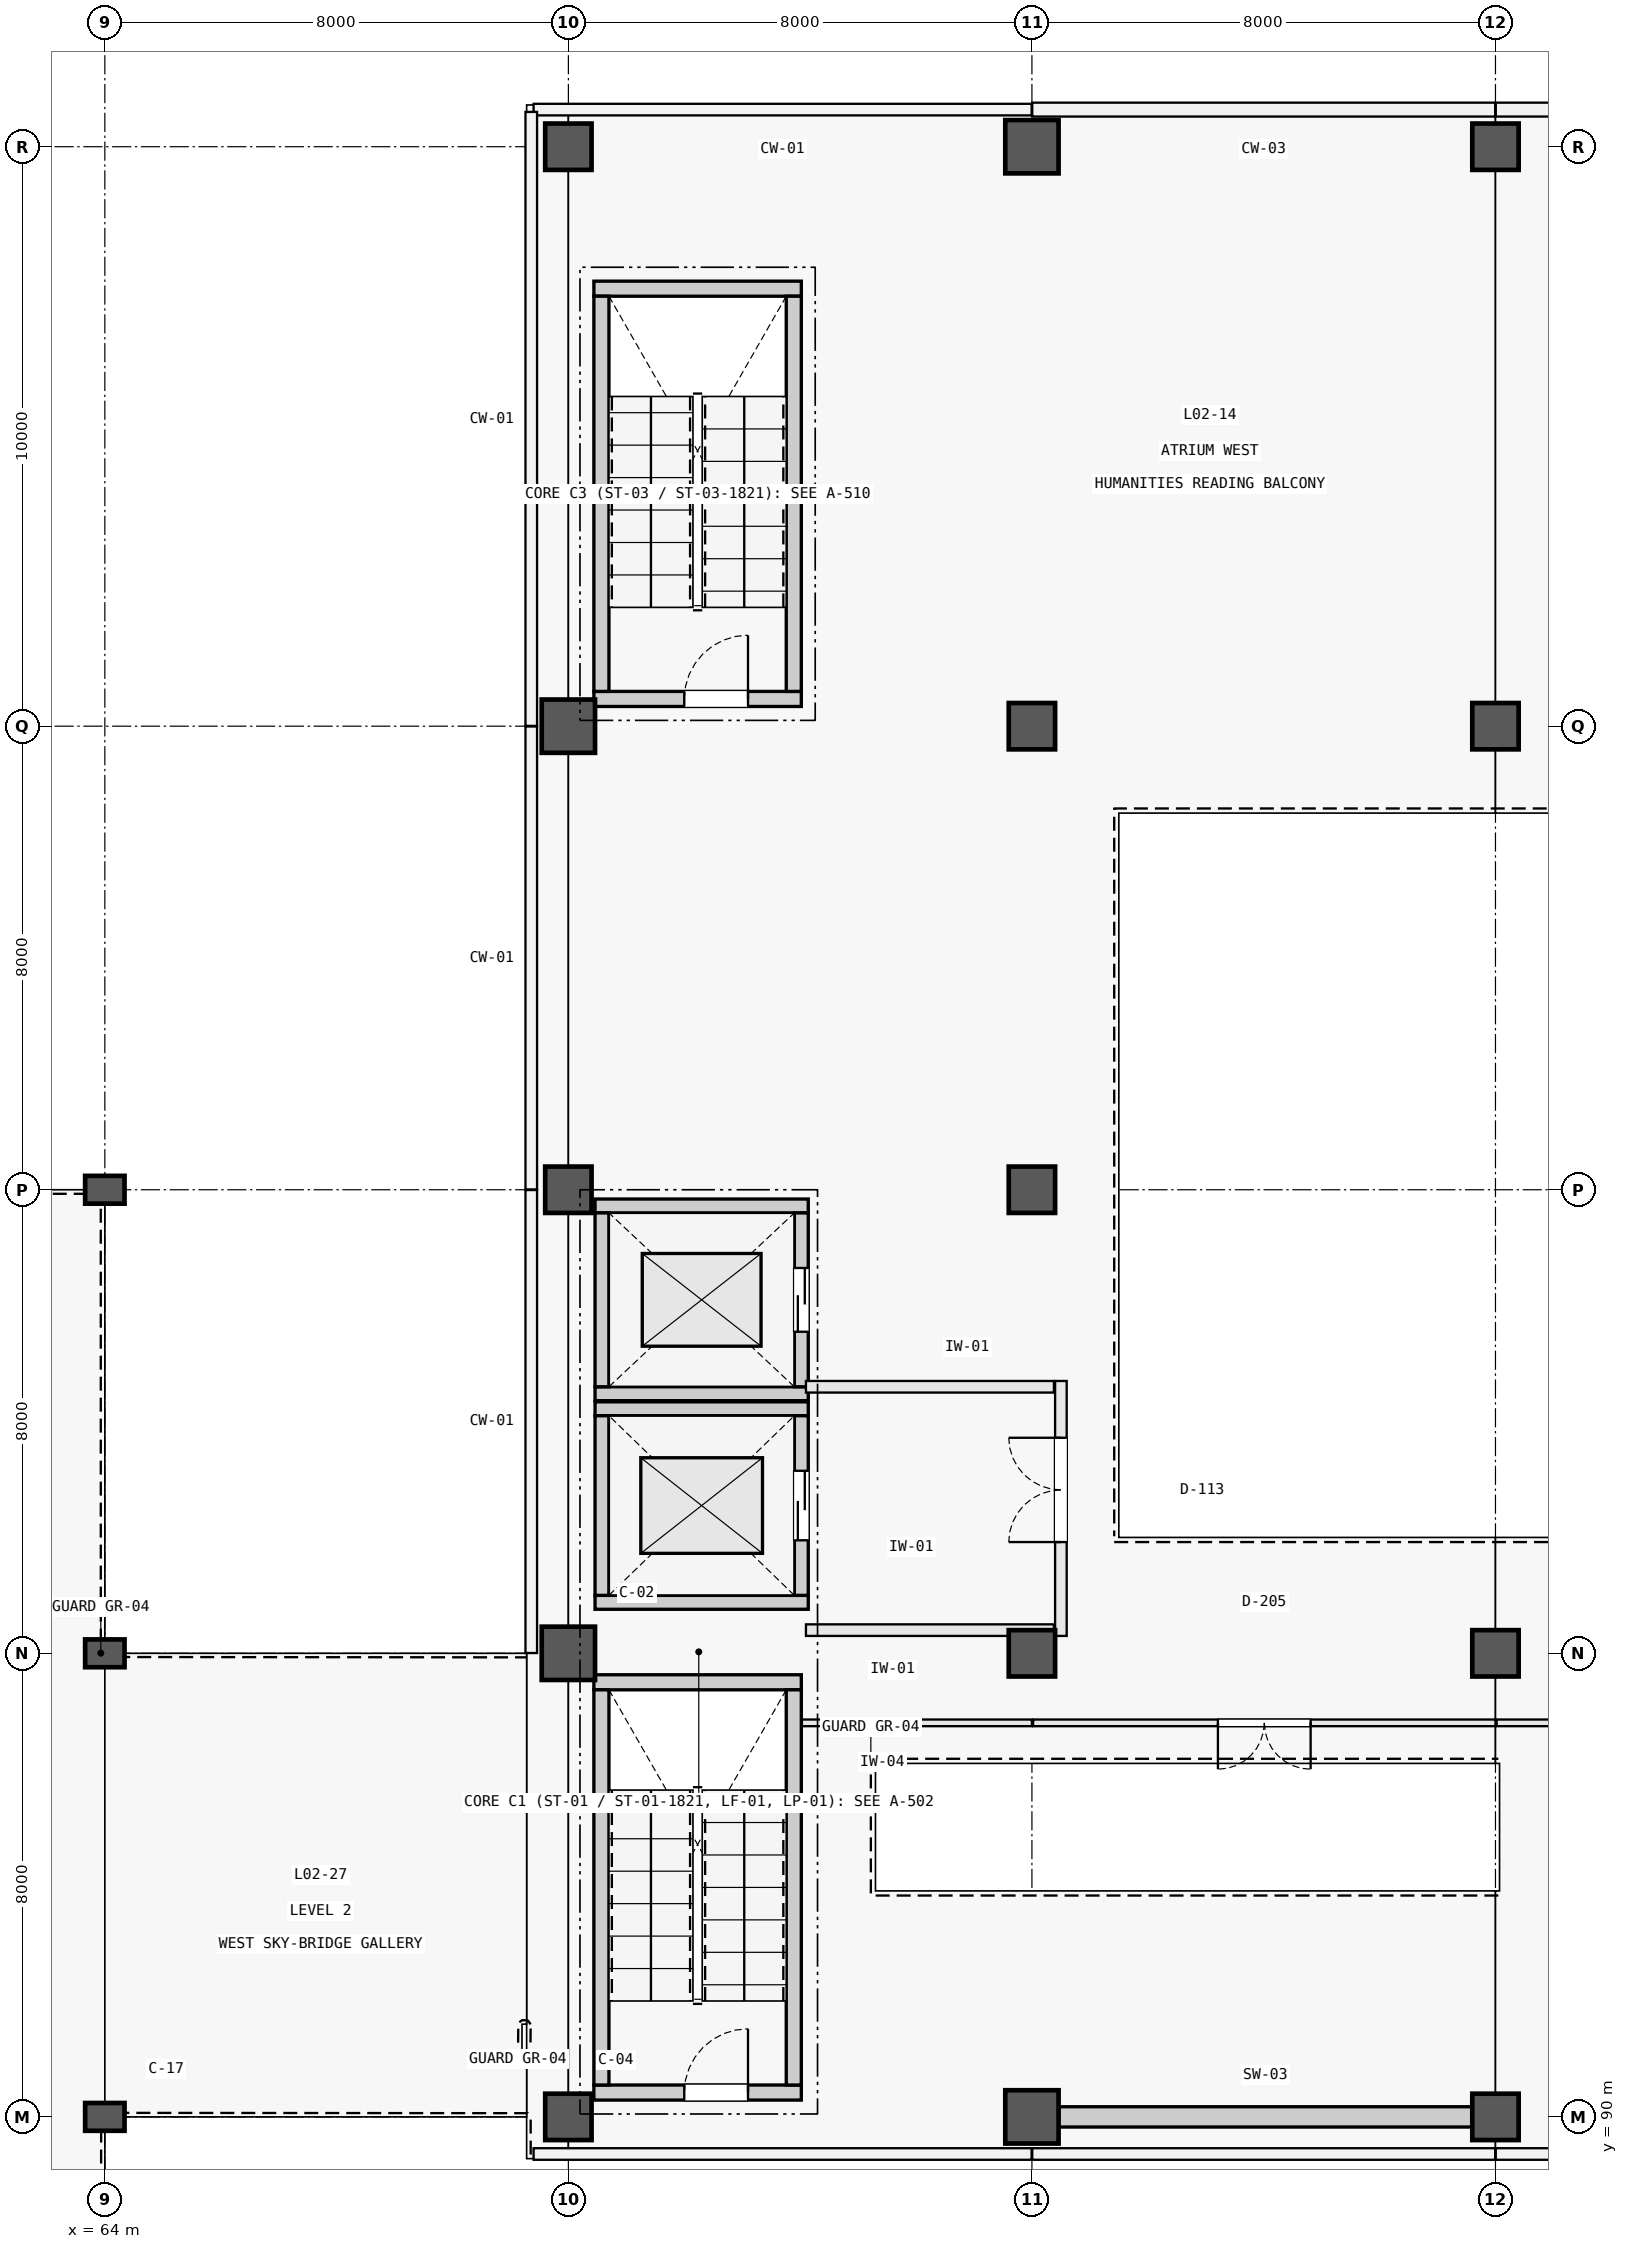
"""IFC4 building model, lengths in metres.
Left out: names, types, materials, properties, quantities, classifications, styles, units other than length and angle.
Written with IfcOpenShell. Run it as: python <this file> out.ifc"""

import sys

from ifc_helpers import new_model, si_unit, direction, frame, frame_2d, origin, origin_2d, place, context, subcontext, project, spatial, rectangle, extrude, element, fill, save


model = new_model("IFC4")
c1 = context("Model", 3, precision=1e-05, world=origin(), true_north=direction((0.0, 1.0)))
c2 = subcontext(c1, "Body", "Model", "MODEL_VIEW")
j1 = project(units=[si_unit("LENGTHUNIT", "METRE"), si_unit("PLANEANGLEUNIT", "RADIAN")], contexts=[c1])
p1 = place(None, origin())
s1 = spatial("IfcSite", under=j1, at=p1, CompositionType="ELEMENT")
p2 = place(p1, origin())
s2 = spatial("IfcBuilding", under=s1, at=p2, CompositionType="ELEMENT")
p3 = place(p2, frame((0.0, 0.0, 5.4)))
s3 = spatial("IfcBuildingStorey", under=s2, at=p3, CompositionType="ELEMENT", Elevation=5.4)
for number, where, z_axis, x_axis in (
    (1, (64.0, 90.0, 0.0), (0.0, 0.0, 1.0), (1.0, 0.0, 0.0)),
    (2, (64.0, 98.0, 0.0), (0.0, 0.0, 1.0), (1.0, 0.0, 0.0)),
    (3, (64.0, 106.0, 0.0), (0.0, 0.0, 1.0), (1.0, 0.0, 0.0)),
):
    element("IfcColumn", number, at=place(p3, frame(where, z_axis=z_axis, x_axis=x_axis)), inside=s3, PredefinedType="COLUMN", context=c2, shape_type="SweptSolid", body=[
        extrude(rectangle(XDim=0.68, YDim=0.48, at=origin_2d()), origin(), (0.0, 0.0, 1.0), 5.1),
    ])
p4 = place(p3, frame((72.0, 90.0, 0.0), z_axis=(0.0, 0.0, 1.0), x_axis=(1.0, 0.0, 0.0)))
e4 = element("IfcColumn", 4, at=p4, inside=s3, PredefinedType="COLUMN", context=c2, shape_type="SweptSolid", body=[
    extrude(rectangle(XDim=0.8, YDim=0.8, at=origin_2d()), origin(), (0.0, 0.0, 1.0), 5.1),
])
p5 = place(p3, frame((72.0, 98.0, 0.0), z_axis=(0.0, 0.0, 1.0), x_axis=(1.0, 0.0, 0.0)))
e5 = element("IfcColumn", 5, at=p5, inside=s3, PredefinedType="COLUMN", context=c2, shape_type="SweptSolid", body=[
    extrude(rectangle(XDim=0.92, YDim=0.92, at=origin_2d()), origin(), (0.0, 0.0, 1.0), 5.1),
])
p6 = place(p3, frame((72.0, 106.0, 0.0), z_axis=(0.0, 0.0, 1.0), x_axis=(1.0, 0.0, 0.0)))
e6 = element("IfcColumn", 6, at=p6, inside=s3, PredefinedType="COLUMN", context=c2, shape_type="SweptSolid", body=[
    extrude(rectangle(XDim=0.8, YDim=0.8, at=origin_2d()), origin(), (0.0, 0.0, 1.0), 5.1),
])
p7 = place(p3, frame((72.0, 114.0, 0.0), z_axis=(0.0, 0.0, 1.0), x_axis=(1.0, 0.0, 0.0)))
e7 = element("IfcColumn", 7, at=p7, inside=s3, PredefinedType="COLUMN", context=c2, shape_type="SweptSolid", body=[
    extrude(rectangle(XDim=0.92, YDim=0.92, at=origin_2d()), origin(), (0.0, 0.0, 1.0), 5.1),
])
p8 = place(p3, frame((72.0, 124.0, 0.0), z_axis=(0.0, 0.0, 1.0), x_axis=(1.0, 0.0, 0.0)))
e8 = element("IfcColumn", 8, at=p8, inside=s3, PredefinedType="COLUMN", context=c2, shape_type="SweptSolid", body=[
    extrude(rectangle(XDim=0.8, YDim=0.8, at=origin_2d()), origin(), (0.0, 0.0, 1.0), 5.1),
])
p9 = place(p3, frame((80.0, 90.0, 0.0), z_axis=(0.0, 0.0, 1.0), x_axis=(1.0, 0.0, 0.0)))
e9 = element("IfcColumn", 9, at=p9, inside=s3, PredefinedType="COLUMN", context=c2, shape_type="SweptSolid", body=[
    extrude(rectangle(XDim=0.92, YDim=0.92, at=origin_2d()), origin(), (0.0, 0.0, 1.0), 5.1),
])
for number, where, z_axis, x_axis in (
    (10, (80.0, 98.0, 0.0), (0.0, 0.0, 1.0), (1.0, 0.0, 0.0)),
    (11, (80.0, 106.0, 0.0), (0.0, 0.0, 1.0), (1.0, 0.0, 0.0)),
    (12, (80.0, 114.0, 0.0), (0.0, 0.0, 1.0), (1.0, 0.0, 0.0)),
):
    element("IfcColumn", number, at=place(p3, frame(where, z_axis=z_axis, x_axis=x_axis)), inside=s3, PredefinedType="COLUMN", context=c2, shape_type="SweptSolid", body=[
        extrude(rectangle(XDim=0.8, YDim=0.8, at=origin_2d()), origin(), (0.0, 0.0, 1.0), 5.1),
    ])
p10 = place(p3, frame((80.0, 124.0, 0.0), z_axis=(0.0, 0.0, 1.0), x_axis=(1.0, 0.0, 0.0)))
e13 = element("IfcColumn", 13, at=p10, inside=s3, PredefinedType="COLUMN", context=c2, shape_type="SweptSolid", body=[
    extrude(rectangle(XDim=0.92, YDim=0.92, at=origin_2d()), origin(), (0.0, 0.0, 1.0), 5.1),
])
for number, where, z_axis, x_axis in (
    (14, (88.0, 90.0, 0.0), (0.0, 0.0, 1.0), (1.0, 0.0, 0.0)),
    (15, (88.0, 98.0, 0.0), (0.0, 0.0, 1.0), (1.0, 0.0, 0.0)),
    (16, (88.0, 114.0, 0.0), (0.0, 0.0, 1.0), (1.0, 0.0, 0.0)),
    (17, (88.0, 124.0, 0.0), (0.0, 0.0, 1.0), (1.0, 0.0, 0.0)),
):
    element("IfcColumn", number, at=place(p3, frame(where, z_axis=z_axis, x_axis=x_axis)), inside=s3, PredefinedType="COLUMN", context=c2, shape_type="SweptSolid", body=[
        extrude(rectangle(XDim=0.8, YDim=0.8, at=origin_2d()), origin(), (0.0, 0.0, 1.0), 5.1),
    ])
p11 = place(p3, frame((80.46, 90.0, 0.0), z_axis=(0.0, 0.0, 1.0), x_axis=(1.0, 0.0, 0.0)))
e18 = element("IfcWall", 18, at=p11, inside=s3, PredefinedType="SHEAR", context=c2, shape_type="SweptSolid", body=[
    extrude(rectangle(XDim=7.14, YDim=0.35, at=frame_2d((3.57, 0.0))), origin(), (0.0, 0.0, 1.0), 4.76),
])
p12 = place(p3, frame((72.44, 90.42, 0.0), z_axis=(0.0, 0.0, 1.0), x_axis=(1.0, 0.0, 0.0)))
e19 = element("IfcWall", 19, at=p12, inside=s3, PredefinedType="SOLIDWALL", context=c2, shape_type="SweptSolid", body=[
    extrude(rectangle(XDim=3.58, YDim=0.26, at=frame_2d((1.79, 0.0))), origin(), (0.0, 0.0, 1.0), 5.1),
])
p13 = place(p12, frame((1.56, 0.0, 0.0)))
e20 = element("IfcOpeningElement", 20, at=p13, cuts=e19, PredefinedType="OPENING", context=c2, shape_type="SweptSolid", body=[
    extrude(rectangle(XDim=1.1, YDim=2.2, at=frame_2d((0.55, 1.1))), frame((0.0, 0.142, 0.0), z_axis=(0.0, -1.0, 0.0), x_axis=(1.0, 0.0, 0.0)), (0.0, 0.0, 1.0), 0.284),
])
p14 = place(p3, frame((72.44, 97.5, 0.0), z_axis=(0.0, 0.0, 1.0), x_axis=(1.0, 0.0, 0.0)))
e21 = element("IfcWall", 21, at=p14, inside=s3, PredefinedType="SOLIDWALL", context=c2, shape_type="SweptSolid", body=[
    extrude(rectangle(XDim=3.58, YDim=0.26, at=frame_2d((1.79, 0.0))), origin(), (0.0, 0.0, 1.0), 5.1),
])
for number, where, z_axis, x_axis in (
    (22, (72.57, 90.55, 0.0), (0.0, 0.0, 1.0), (0.0, 1.0, 0.0)),
    (23, (75.89, 90.55, 0.0), (0.0, 0.0, 1.0), (0.0, 1.0, 0.0)),
):
    element("IfcWall", number, at=place(p3, frame(where, z_axis=z_axis, x_axis=x_axis)), inside=s3, PredefinedType="SOLIDWALL", context=c2, shape_type="SweptSolid", body=[
        extrude(rectangle(XDim=6.82, YDim=0.26, at=frame_2d((3.41, 0.0))), origin(), (0.0, 0.0, 1.0), 5.1),
    ])
p15 = place(p3, frame((72.44, 114.47, 0.0), z_axis=(0.0, 0.0, 1.0), x_axis=(1.0, 0.0, 0.0)))
e24 = element("IfcWall", 24, at=p15, inside=s3, PredefinedType="SOLIDWALL", context=c2, shape_type="SweptSolid", body=[
    extrude(rectangle(XDim=3.58, YDim=0.26, at=frame_2d((1.79, 0.0))), origin(), (0.0, 0.0, 1.0), 5.1),
])
p16 = place(p15, frame((1.56, 0.0, 0.0)))
e25 = element("IfcOpeningElement", 25, at=p16, cuts=e24, PredefinedType="OPENING", context=c2, shape_type="SweptSolid", body=[
    extrude(rectangle(XDim=1.1, YDim=2.2, at=frame_2d((0.55, 1.1))), frame((0.0, 0.142, 0.0), z_axis=(0.0, -1.0, 0.0), x_axis=(1.0, 0.0, 0.0)), (0.0, 0.0, 1.0), 0.284),
])
p17 = place(p3, frame((72.44, 121.55, 0.0), z_axis=(0.0, 0.0, 1.0), x_axis=(1.0, 0.0, 0.0)))
e26 = element("IfcWall", 26, at=p17, inside=s3, PredefinedType="SOLIDWALL", context=c2, shape_type="SweptSolid", body=[
    extrude(rectangle(XDim=3.58, YDim=0.26, at=frame_2d((1.79, 0.0))), origin(), (0.0, 0.0, 1.0), 5.1),
])
for number, where, z_axis, x_axis in (
    (27, (72.57, 114.6, 0.0), (0.0, 0.0, 1.0), (0.0, 1.0, 0.0)),
    (28, (75.89, 114.6, 0.0), (0.0, 0.0, 1.0), (0.0, 1.0, 0.0)),
):
    element("IfcWall", number, at=place(p3, frame(where, z_axis=z_axis, x_axis=x_axis)), inside=s3, PredefinedType="SOLIDWALL", context=c2, shape_type="SweptSolid", body=[
        extrude(rectangle(XDim=6.82, YDim=0.26, at=frame_2d((3.41, 0.0))), origin(), (0.0, 0.0, 1.0), 5.1),
    ])
for number, where, z_axis, x_axis in (
    (29, (72.46, 98.88, 0.0), (0.0, 0.0, 1.0), (1.0, 0.0, 0.0)),
    (30, (72.46, 102.22, 0.0), (0.0, 0.0, 1.0), (1.0, 0.0, 0.0)),
):
    element("IfcWall", number, at=place(p3, frame(where, z_axis=z_axis, x_axis=x_axis)), inside=s3, PredefinedType="SOLIDWALL", context=c2, shape_type="SweptSolid", body=[
        extrude(rectangle(XDim=3.68, YDim=0.24, at=frame_2d((1.84, 0.0))), origin(), (0.0, 0.0, 1.0), 5.1),
    ])
p18 = place(p3, frame((72.58, 99.0, 0.0), z_axis=(0.0, 0.0, 1.0), x_axis=(0.0, 1.0, 0.0)))
e31 = element("IfcWall", 31, at=p18, inside=s3, PredefinedType="SOLIDWALL", context=c2, shape_type="SweptSolid", body=[
    extrude(rectangle(XDim=3.1, YDim=0.24, at=frame_2d((1.55, 0.0))), origin(), (0.0, 0.0, 1.0), 5.1),
])
p19 = place(p3, frame((76.02, 99.0, 0.0), z_axis=(0.0, 0.0, 1.0), x_axis=(0.0, 1.0, 0.0)))
e32 = element("IfcWall", 32, at=p19, inside=s3, PredefinedType="SOLIDWALL", context=c2, shape_type="SweptSolid", body=[
    extrude(rectangle(XDim=3.1, YDim=0.24, at=frame_2d((1.55, 0.0))), origin(), (0.0, 0.0, 1.0), 5.1),
])
p20 = place(p19, frame((0.95, 0.0, 0.0)))
e33 = element("IfcOpeningElement", 33, at=p20, cuts=e32, PredefinedType="OPENING", context=c2, shape_type="SweptSolid", body=[
    extrude(rectangle(XDim=1.2, YDim=2.2, at=frame_2d((0.6, 1.1))), frame((0.0, 0.132, 0.0), z_axis=(0.0, -1.0, 0.0), x_axis=(1.0, 0.0, 0.0)), (0.0, 0.0, 1.0), 0.264),
])
for number, where, z_axis, x_axis in (
    (34, (72.46, 102.48, 0.0), (0.0, 0.0, 1.0), (1.0, 0.0, 0.0)),
    (35, (72.46, 105.72, 0.0), (0.0, 0.0, 1.0), (1.0, 0.0, 0.0)),
):
    element("IfcWall", number, at=place(p3, frame(where, z_axis=z_axis, x_axis=x_axis)), inside=s3, PredefinedType="SOLIDWALL", context=c2, shape_type="SweptSolid", body=[
        extrude(rectangle(XDim=3.68, YDim=0.24, at=frame_2d((1.84, 0.0))), origin(), (0.0, 0.0, 1.0), 5.1),
    ])
p21 = place(p3, frame((72.58, 102.6, 0.0), z_axis=(0.0, 0.0, 1.0), x_axis=(0.0, 1.0, 0.0)))
e36 = element("IfcWall", 36, at=p21, inside=s3, PredefinedType="SOLIDWALL", context=c2, shape_type="SweptSolid", body=[
    extrude(rectangle(XDim=3.0, YDim=0.24, at=frame_2d((1.5, 0.0))), origin(), (0.0, 0.0, 1.0), 5.1),
])
p22 = place(p3, frame((76.02, 102.6, 0.0), z_axis=(0.0, 0.0, 1.0), x_axis=(0.0, 1.0, 0.0)))
e37 = element("IfcWall", 37, at=p22, inside=s3, PredefinedType="SOLIDWALL", context=c2, shape_type="SweptSolid", body=[
    extrude(rectangle(XDim=3.0, YDim=0.24, at=frame_2d((1.5, 0.0))), origin(), (0.0, 0.0, 1.0), 5.1),
])
p23 = place(p22, frame((0.95, 0.0, 0.0)))
e38 = element("IfcOpeningElement", 38, at=p23, cuts=e37, PredefinedType="OPENING", context=c2, shape_type="SweptSolid", body=[
    extrude(rectangle(XDim=1.1, YDim=2.2, at=frame_2d((0.55, 1.1))), frame((0.0, 0.132, 0.0), z_axis=(0.0, -1.0, 0.0), x_axis=(1.0, 0.0, 0.0)), (0.0, 0.0, 1.0), 0.264),
])
for number, where, z_axis, x_axis in (
    (39, (76.1, 98.4, 0.0), (0.0, 0.0, 1.0), (1.0, 0.0, 0.0)),
    (40, (76.1, 102.6, 0.0), (0.0, 0.0, 1.0), (1.0, 0.0, 0.0)),
):
    element("IfcWall", number, at=place(p3, frame(where, z_axis=z_axis, x_axis=x_axis)), inside=s3, PredefinedType="PARTITIONING", context=c2, shape_type="SweptSolid", body=[
        extrude(rectangle(XDim=4.28, YDim=0.2, at=frame_2d((2.14, 0.0))), origin(), (0.0, 0.0, 1.0), 3.78),
    ])
p24 = place(p3, frame((80.5, 98.3, 0.0), z_axis=(0.0, 0.0, 1.0), x_axis=(0.0, 1.0, 0.0)))
e41 = element("IfcWall", 41, at=p24, inside=s3, PredefinedType="PARTITIONING", context=c2, shape_type="SweptSolid", body=[
    extrude(rectangle(XDim=4.4, YDim=0.2, at=frame_2d((2.2, 0.0))), origin(), (0.0, 0.0, 1.0), 3.78),
])
p25 = place(p24, frame((1.62, 0.0, 0.0)))
e42 = element("IfcOpeningElement", 42, at=p25, cuts=e41, PredefinedType="OPENING", context=c2, shape_type="SweptSolid", body=[
    extrude(rectangle(XDim=1.8, YDim=2.25, at=frame_2d((0.9, 1.125))), frame((0.0, 0.112, 0.0), z_axis=(0.0, -1.0, 0.0), x_axis=(1.0, 0.0, 0.0)), (0.0, 0.0, 1.0), 0.224),
])
p26 = place(p3, frame((76.03, 96.8, 0.0), z_axis=(0.0, 0.0, 1.0), x_axis=(1.0, 0.0, 0.0)))
e43 = element("IfcWall", 43, at=p26, inside=s3, PredefinedType="PARTITIONING", context=c2, shape_type="SweptSolid", body=[
    extrude(rectangle(XDim=3.97, YDim=0.115, at=frame_2d((1.985, 0.0))), origin(), (0.0, 0.0, 1.0), 3.61),
])
p27 = place(p3, frame((80.02, 96.8, 0.0), z_axis=(0.0, 0.0, 1.0), x_axis=(1.0, 0.0, 0.0)))
e44 = element("IfcWall", 44, at=p27, inside=s3, PredefinedType="PARTITIONING", context=c2, shape_type="SweptSolid", body=[
    extrude(rectangle(XDim=7.98, YDim=0.115, at=frame_2d((3.99, 0.0))), origin(), (0.0, 0.0, 1.0), 3.61),
])
p28 = place(p27, frame((3.19, 0.0, 0.0)))
e45 = element("IfcOpeningElement", 45, at=p28, cuts=e44, PredefinedType="OPENING", context=c2, shape_type="SweptSolid", body=[
    extrude(rectangle(XDim=1.6, YDim=2.2, at=frame_2d((0.8, 1.1))), frame((0.0, 0.069, 0.0), z_axis=(0.0, -1.0, 0.0), x_axis=(1.0, 0.0, 0.0)), (0.0, 0.0, 1.0), 0.139),
])
p29 = place(p3, frame((88.02, 96.8, 0.0), z_axis=(0.0, 0.0, 1.0), x_axis=(1.0, 0.0, 0.0)))
e46 = element("IfcWall", 46, at=p29, inside=s3, PredefinedType="PARTITIONING", context=c2, shape_type="SweptSolid", body=[
    extrude(rectangle(XDim=7.98, YDim=0.115, at=frame_2d((3.99, 0.0))), origin(), (0.0, 0.0, 1.0), 3.61),
])
p30 = place(p29, frame((3.515, 0.0, 0.0)))
e47 = element("IfcOpeningElement", 47, at=p30, cuts=e46, PredefinedType="OPENING", context=c2, shape_type="SweptSolid", body=[
    extrude(rectangle(XDim=0.95, YDim=2.15, at=frame_2d((0.475, 1.075))), frame((0.0, 0.069, 0.0), z_axis=(0.0, -1.0, 0.0), x_axis=(1.0, 0.0, 0.0)), (0.0, 0.0, 1.0), 0.139),
])
p31 = place(p13, origin())
e48 = element("IfcDoor", 48, at=p31, inside=s3, OperationType="SINGLE_SWING_RIGHT", PredefinedType="DOOR", context=c2, shape_type="SweptSolid", body=[
    extrude(rectangle(XDim=1.1, YDim=2.2, at=frame_2d((0.55, 1.1))), frame((0.0, 0.025, 0.0), z_axis=(0.0, -1.0, 0.0), x_axis=(1.0, 0.0, 0.0)), (0.0, 0.0, 1.0), 0.05),
])
fill(e20, e48)
p32 = place(p16, origin())
e49 = element("IfcDoor", 49, at=p32, inside=s3, OperationType="SINGLE_SWING_RIGHT", PredefinedType="DOOR", context=c2, shape_type="SweptSolid", body=[
    extrude(rectangle(XDim=1.1, YDim=2.2, at=frame_2d((0.55, 1.1))), frame((0.0, 0.025, 0.0), z_axis=(0.0, -1.0, 0.0), x_axis=(1.0, 0.0, 0.0)), (0.0, 0.0, 1.0), 0.05),
])
fill(e25, e49)
p33 = place(p20, origin())
e50 = element("IfcDoor", 50, at=p33, inside=s3, OperationType="DOUBLE_DOOR_SLIDING", PredefinedType="DOOR", context=c2, shape_type="SweptSolid", body=[
    extrude(rectangle(XDim=1.2, YDim=2.2, at=frame_2d((0.6, 1.1))), frame((0.0, 0.025, 0.0), z_axis=(0.0, -1.0, 0.0), x_axis=(1.0, 0.0, 0.0)), (0.0, 0.0, 1.0), 0.05),
])
fill(e33, e50)
p34 = place(p23, origin())
e51 = element("IfcDoor", 51, at=p34, inside=s3, OperationType="DOUBLE_DOOR_SLIDING", PredefinedType="DOOR", context=c2, shape_type="SweptSolid", body=[
    extrude(rectangle(XDim=1.1, YDim=2.2, at=frame_2d((0.55, 1.1))), frame((0.0, 0.025, 0.0), z_axis=(0.0, -1.0, 0.0), x_axis=(1.0, 0.0, 0.0)), (0.0, 0.0, 1.0), 0.05),
])
fill(e38, e51)
p35 = place(p25, origin())
e52 = element("IfcDoor", 52, at=p35, inside=s3, OperationType="DOUBLE_DOOR_SINGLE_SWING", PredefinedType="DOOR", context=c2, shape_type="SweptSolid", body=[
    extrude(rectangle(XDim=1.8, YDim=2.25, at=frame_2d((0.9, 1.125))), frame((0.0, 0.025, 0.0), z_axis=(0.0, -1.0, 0.0), x_axis=(1.0, 0.0, 0.0)), (0.0, 0.0, 1.0), 0.05),
])
fill(e42, e52)
p36 = place(p28, frame((1.6, 0.0, 0.0), z_axis=(0.0, 0.0, 1.0), x_axis=(-1.0, 0.0, 0.0)))
e53 = element("IfcDoor", 53, at=p36, inside=s3, OperationType="DOUBLE_DOOR_SINGLE_SWING", PredefinedType="DOOR", context=c2, shape_type="SweptSolid", body=[
    extrude(rectangle(XDim=1.6, YDim=2.2, at=frame_2d((0.8, 1.1))), frame((0.0, 0.025, 0.0), z_axis=(0.0, -1.0, 0.0), x_axis=(1.0, 0.0, 0.0)), (0.0, 0.0, 1.0), 0.05),
])
fill(e45, e53)
save(model, sys.argv[1])
